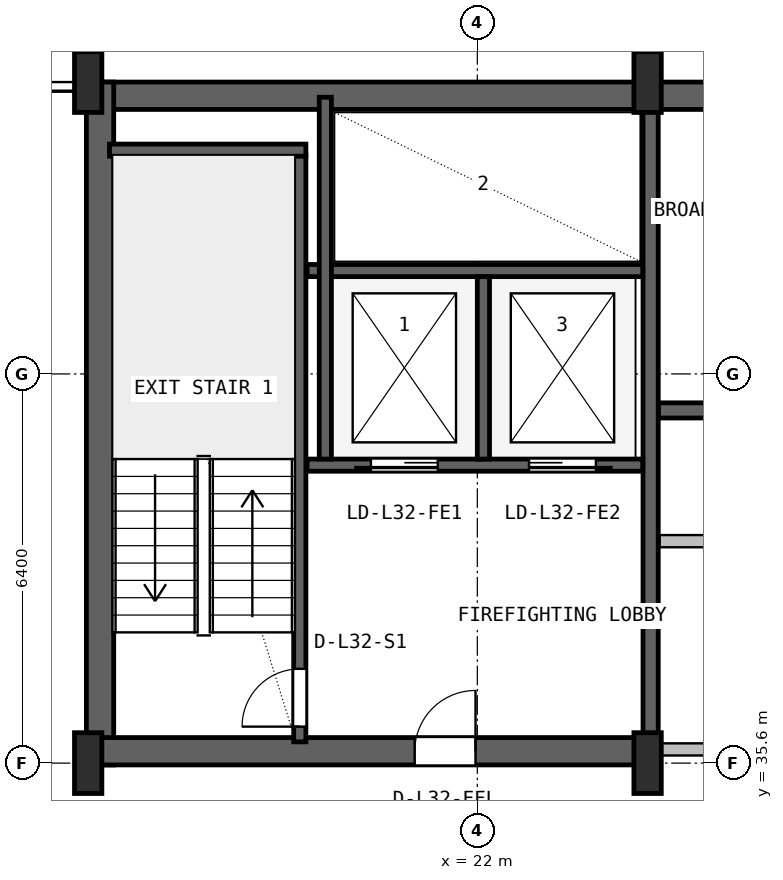
"""IFC4 building model, lengths in metres.
Left out: names, types, materials, properties, quantities, classifications, styles, units other than length and angle.
Written with IfcOpenShell. Run it as: python <this file> out.ifc"""

import sys

from ifc_helpers import new_model, si_unit, direction, frame, frame_2d, origin, origin_2d, place, context, subcontext, project, spatial, rectangle, i_section, extrude, source, transform, mapped, element, fill, save


model = new_model("IFC4")
c1 = context("Model", 3, precision=1e-05, world=origin(), true_north=direction((0.0, 1.0)))
c2 = subcontext(c1, "Body", "Model", "MODEL_VIEW")
j1 = project(units=[si_unit("LENGTHUNIT", "METRE"), si_unit("PLANEANGLEUNIT", "RADIAN")], contexts=[c1])
p1 = place(None, origin())
s1 = spatial("IfcSite", under=j1, at=p1, CompositionType="ELEMENT")
p2 = place(p1, origin())
s2 = spatial("IfcBuilding", under=s1, at=p2, CompositionType="ELEMENT")
p3 = place(p2, frame((0.0, 0.0, 133.4)))
s3 = spatial("IfcBuildingStorey", under=s2, at=p3, CompositionType="ELEMENT", Elevation=133.4)
p4 = place(p3, frame((15.6, 46.575, 0.0), z_axis=(0.0, 0.0, 1.0), x_axis=(1.0, 0.0, 0.0)))
e1 = element("IfcWall", 1, at=p4, inside=s3, PredefinedType="SHEAR", context=c2, shape_type="SweptSolid", body=[
    extrude(rectangle(XDim=36.8, YDim=0.45, at=frame_2d((18.4, 0.0))), origin(), (0.0, 0.0, 1.0), 3.55),
])
p5 = place(p3, frame((15.795, 35.57, 0.0), z_axis=(0.0, 0.0, 1.0), x_axis=(0.0, 1.0, 0.0)))
e2 = element("IfcWall", 2, at=p5, inside=s3, PredefinedType="SHEAR", context=c2, shape_type="SweptSolid", body=[
    extrude(rectangle(XDim=11.23, YDim=0.45, at=frame_2d((5.615, 0.0))), origin(), (0.0, 0.0, 1.0), 3.55),
])
p6 = place(p3, frame((15.57, 35.795, 0.0), z_axis=(0.0, 0.0, 1.0), x_axis=(1.0, 0.0, 0.0)))
e3 = element("IfcWall", 3, at=p6, inside=s3, PredefinedType="SHEAR", context=c2, shape_type="SweptSolid", body=[
    extrude(rectangle(XDim=9.23, YDim=0.45, at=frame_2d((4.615, 0.0))), origin(), (0.0, 0.0, 1.0), 3.55),
])
p7 = place(p6, frame((5.4, 0.0, 0.0)))
e4 = element("IfcOpeningElement", 4, at=p7, cuts=e3, PredefinedType="OPENING", context=c2, shape_type="SweptSolid", body=[
    extrude(rectangle(XDim=1.0, YDim=2.1, at=frame_2d((0.5, 1.05))), frame((0.0, 0.235, 0.0), z_axis=(0.0, -1.0, 0.0), x_axis=(1.0, 0.0, 0.0)), (0.0, 0.0, 1.0), 0.47),
])
m1 = source(origin(), c2, "Body", "SweptSolid", [
    extrude(i_section(OverallWidth=0.45, OverallDepth=1.0, WebThickness=0.016, FlangeThickness=0.03, FilletRadius=0.016, at=origin_2d()), origin(), (0.0, 0.0, 1.0), 3.8),
])
for number, where, z_axis, x_axis in (
    (5, (15.6, 35.6, 0.0), (0.0, 0.0, 1.0), (1.0, 0.0, 0.0)),
    (6, (15.6, 46.8, 0.0), (0.0, 0.0, 1.0), (1.0, 0.0, 0.0)),
    (7, (24.8, 35.6, 0.0), (0.0, 0.0, 1.0), (1.0, 0.0, 0.0)),
    (8, (24.8, 46.8, 0.0), (0.0, 0.0, 1.0), (1.0, 0.0, 0.0)),
):
    element("IfcColumn", number, at=place(p3, frame(where, z_axis=z_axis, x_axis=x_axis)), inside=s3, PredefinedType="COLUMN", context=c2, shape_type="MappedRepresentation", body=[
        mapped(m1, transform((0.0, 0.0, 0.0), x_axis=(1.0, 0.0, 0.0), y_axis=(0.0, 1.0, 0.0), z_axis=(0.0, 0.0, 1.0), scale=1.0)),
    ])
p8 = place(p3, frame((19.08, 35.95, 0.0), z_axis=(0.0, 0.0, 1.0), x_axis=(0.0, 1.0, 0.0)))
e9 = element("IfcWall", 9, at=p8, inside=s3, PredefinedType="SHEAR", context=c2, shape_type="SweptSolid", body=[
    extrude(rectangle(XDim=9.65, YDim=0.2, at=frame_2d((4.825, 0.0))), origin(), (0.0, 0.0, 1.0), 3.55),
])
p9 = place(p8, frame((0.25, 0.0, 0.0)))
e10 = element("IfcOpeningElement", 10, at=p9, cuts=e9, PredefinedType="OPENING", context=c2, shape_type="SweptSolid", body=[
    extrude(rectangle(XDim=0.95, YDim=2.1, at=frame_2d((0.475, 1.05))), frame((0.0, 0.11, 0.0), z_axis=(0.0, -1.0, 0.0), x_axis=(1.0, 0.0, 0.0)), (0.0, 0.0, 1.0), 0.22),
])
p10 = place(p3, frame((15.95, 45.68, 0.0), z_axis=(0.0, 0.0, 1.0), x_axis=(1.0, 0.0, 0.0)))
e11 = element("IfcWall", 11, at=p10, inside=s3, PredefinedType="SHEAR", context=c2, shape_type="SweptSolid", body=[
    extrude(rectangle(XDim=3.23, YDim=0.2, at=frame_2d((1.615, 0.0))), origin(), (0.0, 0.0, 1.0), 3.55),
])
p11 = place(p3, frame((24.85, 36.05, 0.0), z_axis=(0.0, 0.0, 1.0), x_axis=(0.0, 1.0, 0.0)))
e12 = element("IfcWall", 12, at=p11, inside=s3, PredefinedType="SHEAR", context=c2, shape_type="SweptSolid", body=[
    extrude(rectangle(XDim=10.45, YDim=0.25, at=frame_2d((5.225, 0.0))), origin(), (0.0, 0.0, 1.0), 3.55),
])
p12 = place(p3, frame((19.2, 40.5, 0.0), z_axis=(0.0, 0.0, 1.0), x_axis=(1.0, 0.0, 0.0)))
e13 = element("IfcWall", 13, at=p12, inside=s3, PredefinedType="SHEAR", context=c2, shape_type="SweptSolid", body=[
    extrude(rectangle(XDim=5.52, YDim=0.2, at=frame_2d((2.76, 0.0))), origin(), (0.0, 0.0, 1.0), 3.55),
])
p13 = place(p12, frame((1.05, 0.0, 0.0)))
e14 = element("IfcOpeningElement", 14, at=p13, cuts=e13, PredefinedType="OPENING", context=c2, shape_type="SweptSolid", body=[
    extrude(rectangle(XDim=1.1, YDim=2.18, at=frame_2d((0.55, 1.09))), frame((0.0, 0.11, 0.0), z_axis=(0.0, -1.0, 0.0), x_axis=(1.0, 0.0, 0.0)), (0.0, 0.0, 1.0), 0.22),
])
p14 = place(p12, frame((3.65, 0.0, 0.0)))
e15 = element("IfcOpeningElement", 15, at=p14, cuts=e13, PredefinedType="OPENING", context=c2, shape_type="SweptSolid", body=[
    extrude(rectangle(XDim=1.1, YDim=2.18, at=frame_2d((0.55, 1.09))), frame((0.0, 0.11, 0.0), z_axis=(0.0, -1.0, 0.0), x_axis=(1.0, 0.0, 0.0)), (0.0, 0.0, 1.0), 0.22),
])
p15 = place(p3, frame((19.2, 43.7, 0.0), z_axis=(0.0, 0.0, 1.0), x_axis=(1.0, 0.0, 0.0)))
e16 = element("IfcWall", 16, at=p15, inside=s3, PredefinedType="SHEAR", context=c2, shape_type="SweptSolid", body=[
    extrude(rectangle(XDim=5.52, YDim=0.2, at=frame_2d((2.76, 0.0))), origin(), (0.0, 0.0, 1.0), 3.55),
])
p16 = place(p3, frame((22.1, 40.6, 0.0), z_axis=(0.0, 0.0, 1.0), x_axis=(0.0, 1.0, 0.0)))
e17 = element("IfcWall", 17, at=p16, inside=s3, PredefinedType="SHEAR", context=c2, shape_type="SweptSolid", body=[
    extrude(rectangle(XDim=3.0, YDim=0.2, at=frame_2d((1.5, 0.0))), origin(), (0.0, 0.0, 1.0), 3.55),
])
p17 = place(p3, frame((19.5, 40.6, 0.0), z_axis=(0.0, 0.0, 1.0), x_axis=(0.0, 1.0, 0.0)))
e18 = element("IfcWall", 18, at=p17, inside=s3, PredefinedType="SHEAR", context=c2, shape_type="SweptSolid", body=[
    extrude(rectangle(XDim=5.95, YDim=0.2, at=frame_2d((2.975, 0.0))), origin(), (0.0, 0.0, 1.0), 3.55),
])
p18 = place(p3, frame((24.98, 41.4, 0.0), z_axis=(0.0, 0.0, 1.0), x_axis=(1.0, 0.0, 0.0)))
e19 = element("IfcWall", 19, at=p18, inside=s3, PredefinedType="SHEAR", context=c2, shape_type="SweptSolid", body=[
    extrude(rectangle(XDim=23.82, YDim=0.25, at=frame_2d((11.91, 0.0))), origin(), (0.0, 0.0, 1.0), 3.55),
])
p19 = place(p18, frame((8.87, 0.0, 0.0)))
e20 = element("IfcOpeningElement", 20, at=p19, cuts=e19, PredefinedType="OPENING", context=c2, shape_type="SweptSolid", body=[
    extrude(rectangle(XDim=1.1, YDim=2.18, at=frame_2d((0.55, 1.09))), frame((0.0, 0.135, 0.0), z_axis=(0.0, -1.0, 0.0), x_axis=(1.0, 0.0, 0.0)), (0.0, 0.0, 1.0), 0.27),
])
p20 = place(p18, frame((11.47, 0.0, 0.0)))
e21 = element("IfcOpeningElement", 21, at=p20, cuts=e19, PredefinedType="OPENING", context=c2, shape_type="SweptSolid", body=[
    extrude(rectangle(XDim=1.1, YDim=2.18, at=frame_2d((0.55, 1.09))), frame((0.0, 0.135, 0.0), z_axis=(0.0, -1.0, 0.0), x_axis=(1.0, 0.0, 0.0)), (0.0, 0.0, 1.0), 0.27),
])
p21 = place(p18, frame((14.07, 0.0, 0.0)))
e22 = element("IfcOpeningElement", 22, at=p21, cuts=e19, PredefinedType="OPENING", context=c2, shape_type="SweptSolid", body=[
    extrude(rectangle(XDim=1.1, YDim=2.18, at=frame_2d((0.55, 1.09))), frame((0.0, 0.135, 0.0), z_axis=(0.0, -1.0, 0.0), x_axis=(1.0, 0.0, 0.0)), (0.0, 0.0, 1.0), 0.27),
])
p22 = place(p18, frame((3.56, 0.0, 0.0)))
e23 = element("IfcOpeningElement", 23, at=p22, cuts=e19, PredefinedType="OPENING", context=c2, shape_type="SweptSolid", body=[
    extrude(rectangle(XDim=1.0, YDim=2.08, at=frame_2d((0.5, 1.04))), frame((0.0, 0.135, 0.0), z_axis=(0.0, -1.0, 0.0), x_axis=(1.0, 0.0, 0.0)), (0.0, 0.0, 1.0), 0.27),
])
p23 = place(p3, frame((25.0, 35.825, 0.0), z_axis=(0.0, 0.0, 1.0), x_axis=(1.0, 0.0, 0.0)))
e24 = element("IfcWall", 24, at=p23, inside=s3, PredefinedType="PLUMBINGWALL", context=c2, shape_type="SweptSolid", body=[
    extrude(rectangle(XDim=9.75, YDim=0.2, at=frame_2d((4.875, 0.0))), origin(), (0.0, 0.0, 1.0), 2.325),
])
p24 = place(p3, frame((25.0, 39.25, 0.0), z_axis=(0.0, 0.0, 1.0), x_axis=(1.0, 0.0, 0.0)))
e25 = element("IfcWall", 25, at=p24, inside=s3, PredefinedType="PLUMBINGWALL", context=c2, shape_type="SweptSolid", body=[
    extrude(rectangle(XDim=9.75, YDim=0.2, at=frame_2d((4.875, 0.0))), origin(), (0.0, 0.0, 1.0), 3.53),
])
p25 = place(p24, frame((1.75, 0.0, 0.0)))
e26 = element("IfcOpeningElement", 26, at=p25, cuts=e25, PredefinedType="OPENING", context=c2, shape_type="SweptSolid", body=[
    extrude(rectangle(XDim=0.9, YDim=2.06, at=frame_2d((0.45, 1.03))), frame((0.0, 0.11, 0.0), z_axis=(0.0, -1.0, 0.0), x_axis=(1.0, 0.0, 0.0)), (0.0, 0.0, 1.0), 0.22),
])
p26 = place(p24, frame((6.725, 0.0, 0.0)))
e27 = element("IfcOpeningElement", 27, at=p26, cuts=e25, PredefinedType="OPENING", context=c2, shape_type="SweptSolid", body=[
    extrude(rectangle(XDim=0.9, YDim=2.06, at=frame_2d((0.45, 1.03))), frame((0.0, 0.11, 0.0), z_axis=(0.0, -1.0, 0.0), x_axis=(1.0, 0.0, 0.0)), (0.0, 0.0, 1.0), 0.22),
])
m2 = source(origin(), c2, "Body", "SweptSolid", [
    extrude(rectangle(XDim=0.95, YDim=2.1, at=frame_2d((0.475, 1.05))), frame((0.0, 0.025, 0.0), z_axis=(0.0, -1.0, 0.0), x_axis=(1.0, 0.0, 0.0)), (0.0, 0.0, 1.0), 0.05),
])
p27 = place(p9, origin())
e28 = element("IfcDoor", 28, at=p27, inside=s3, OperationType="SINGLE_SWING_LEFT", PredefinedType="DOOR", context=c2, shape_type="MappedRepresentation", body=[
    mapped(m2, transform((0.0, 0.0, 0.0), x_axis=(1.0, 0.0, 0.0), y_axis=(0.0, 1.0, 0.0), z_axis=(0.0, 0.0, 1.0), scale=1.0)),
])
fill(e10, e28)
m3 = source(origin(), c2, "Body", "SweptSolid", [
    extrude(rectangle(XDim=1.0, YDim=2.1, at=frame_2d((0.5, 1.05))), frame((0.0, 0.025, 0.0), z_axis=(0.0, -1.0, 0.0), x_axis=(1.0, 0.0, 0.0)), (0.0, 0.0, 1.0), 0.05),
])
p28 = place(p7, origin())
e29 = element("IfcDoor", 29, at=p28, inside=s3, OperationType="SINGLE_SWING_RIGHT", PredefinedType="DOOR", context=c2, shape_type="MappedRepresentation", body=[
    mapped(m3, transform((0.0, 0.0, 0.0), x_axis=(1.0, 0.0, 0.0), y_axis=(0.0, 1.0, 0.0), z_axis=(0.0, 0.0, 1.0), scale=1.0)),
])
fill(e4, e29)
m4 = source(origin(), c2, "Body", "SweptSolid", [
    extrude(rectangle(XDim=1.1, YDim=2.18, at=frame_2d((0.55, 1.09))), frame((0.0, 0.025, 0.0), z_axis=(0.0, -1.0, 0.0), x_axis=(1.0, 0.0, 0.0)), (0.0, 0.0, 1.0), 0.05),
])
p29 = place(p13, frame((1.1, 0.0, 0.0), z_axis=(0.0, 0.0, 1.0), x_axis=(-1.0, 0.0, 0.0)))
e30 = element("IfcDoor", 30, at=p29, inside=s3, OperationType="SLIDING_TO_LEFT", PredefinedType="DOOR", context=c2, shape_type="MappedRepresentation", body=[
    mapped(m4, transform((0.0, 0.0, 0.0), x_axis=(1.0, 0.0, 0.0), y_axis=(0.0, 1.0, 0.0), z_axis=(0.0, 0.0, 1.0), scale=1.0)),
])
fill(e14, e30)
p30 = place(p14, frame((1.1, 0.0, 0.0), z_axis=(0.0, 0.0, 1.0), x_axis=(-1.0, 0.0, 0.0)))
e31 = element("IfcDoor", 31, at=p30, inside=s3, OperationType="SLIDING_TO_RIGHT", PredefinedType="DOOR", context=c2, shape_type="MappedRepresentation", body=[
    mapped(m4, transform((0.0, 0.0, 0.0), x_axis=(1.0, 0.0, 0.0), y_axis=(0.0, 1.0, 0.0), z_axis=(0.0, 0.0, 1.0), scale=1.0)),
])
fill(e15, e31)
save(model, sys.argv[1])
